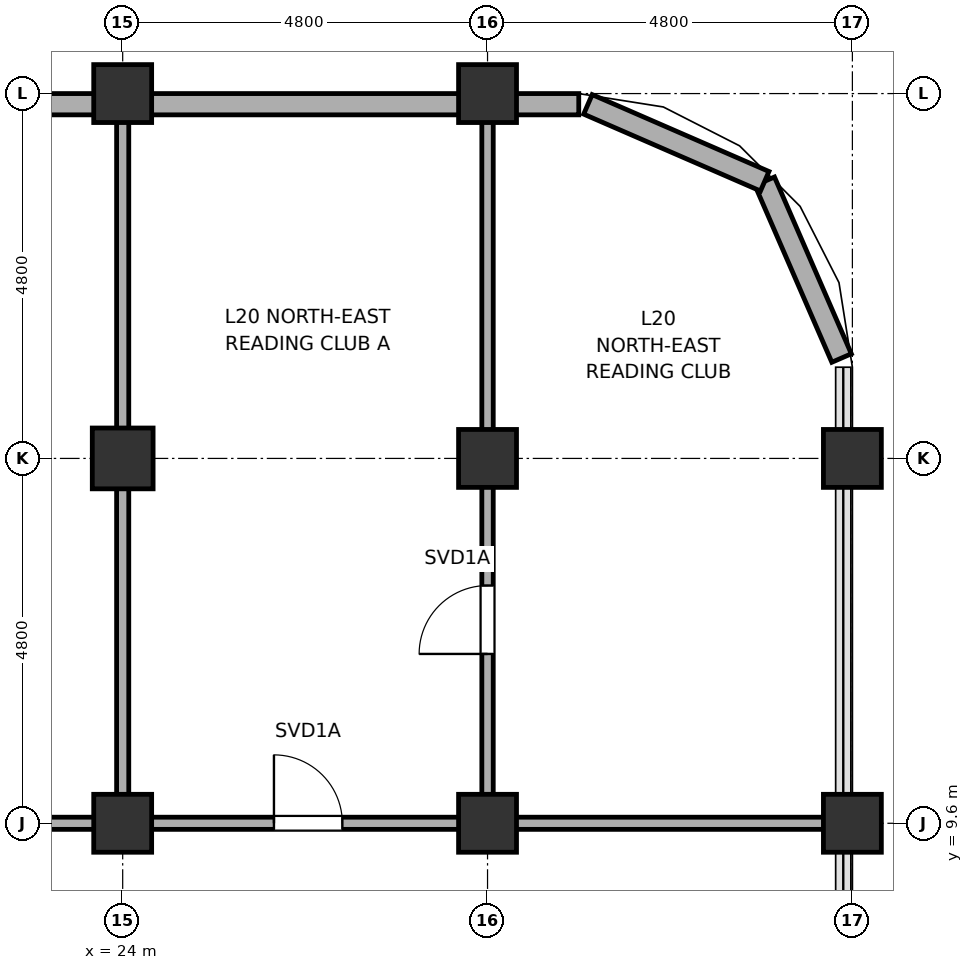
"""IFC4 building model, lengths in metres.
Left out: names, types, materials, properties, quantities, classifications, styles, units other than length and angle.
Written with IfcOpenShell. Run it as: python <this file> out.ifc"""

import sys

from ifc_helpers import new_model, si_unit, direction, frame, frame_2d, origin, origin_2d, place, context, subcontext, project, spatial, rectangle, hollow_rectangle, hollow_circle, extrude, element, fill, save


model = new_model("IFC4")
c1 = context("Model", 3, precision=1e-05, world=origin(), true_north=direction((0.0, 1.0)))
c2 = subcontext(c1, "Body", "Model", "MODEL_VIEW")
j1 = project(units=[si_unit("LENGTHUNIT", "METRE"), si_unit("PLANEANGLEUNIT", "RADIAN")], contexts=[c1])
p1 = place(None, origin())
s1 = spatial("IfcSite", under=j1, at=p1, CompositionType="ELEMENT")
p2 = place(p1, origin())
s2 = spatial("IfcBuilding", under=s1, at=p2, CompositionType="ELEMENT")
p3 = place(p2, frame((0.0, 0.0, 85.5)))
s3 = spatial("IfcBuildingStorey", under=s2, at=p3, CompositionType="ELEMENT", Elevation=85.5)
p4 = place(p3, frame((24.0, 9.6, 0.0), z_axis=(0.0, 0.0, 1.0), x_axis=(1.0, 0.0, 0.0)))
e1 = element("IfcColumn", 1, at=p4, inside=s3, PredefinedType="COLUMN", context=c2, shape_type="SweptSolid", body=[
    extrude(hollow_circle(Radius=0.381, WallThickness=0.032, at=origin_2d()), origin(), (0.0, 0.0, 1.0), 3.7),
])
p5 = place(p3, frame((24.0, 14.4, 0.0), z_axis=(0.0, 0.0, 1.0), x_axis=(1.0, 0.0, 0.0)))
e2 = element("IfcColumn", 2, at=p5, inside=s3, PredefinedType="COLUMN", context=c2, shape_type="SweptSolid", body=[
    extrude(hollow_rectangle(XDim=0.8, YDim=0.8, WallThickness=0.036, at=origin_2d()), origin(), (0.0, 0.0, 1.0), 3.7),
])
for number, where, z_axis, x_axis in (
    (3, (24.0, 19.2, 0.0), (0.0, 0.0, 1.0), (1.0, 0.0, 0.0)),
    (4, (28.8, 9.6, 0.0), (0.0, 0.0, 1.0), (1.0, 0.0, 0.0)),
    (5, (28.8, 14.4, 0.0), (0.0, 0.0, 1.0), (1.0, 0.0, 0.0)),
    (6, (28.8, 19.2, 0.0), (0.0, 0.0, 1.0), (1.0, 0.0, 0.0)),
    (7, (33.6, 9.6, 0.0), (0.0, 0.0, 1.0), (1.0, 0.0, 0.0)),
    (8, (33.6, 14.4, 0.0), (0.0, 0.0, 1.0), (1.0, 0.0, 0.0)),
):
    element("IfcColumn", number, at=place(p3, frame(where, z_axis=z_axis, x_axis=x_axis)), inside=s3, PredefinedType="COLUMN", context=c2, shape_type="SweptSolid", body=[
        extrude(hollow_circle(Radius=0.381, WallThickness=0.032, at=origin_2d()), origin(), (0.0, 0.0, 1.0), 3.7),
    ])
p6 = place(p3, frame((33.458, 15.721, 0.0), z_axis=(0.0, 0.0, 1.0), x_axis=(-0.398792985289, 0.917040977756, 0.0)))
e9 = element("IfcWall", 9, at=p6, inside=s3, PredefinedType="SOLIDWALL", context=c2, shape_type="SweptSolid", body=[
    extrude(rectangle(XDim=2.536, YDim=0.28, at=frame_2d((1.268, 0.0))), origin(), (0.0, 0.0, 1.0), 2.05),
])
p7 = place(p3, frame((32.447, 18.047, 0.0), z_axis=(0.0, 0.0, 1.0), x_axis=(-0.917060872934, 0.398747232384, 0.0)))
e10 = element("IfcWall", 10, at=p7, inside=s3, PredefinedType="SOLIDWALL", context=c2, shape_type="SweptSolid", body=[
    extrude(rectangle(XDim=2.536, YDim=0.28, at=frame_2d((1.268, 0.0))), origin(), (0.0, 0.0, 1.0), 2.05),
])
p8 = place(p3, frame((4.75, 19.06, 0.0), z_axis=(0.0, 0.0, 1.0), x_axis=(1.0, 0.0, 0.0)))
e11 = element("IfcWall", 11, at=p8, inside=s3, PredefinedType="SOLIDWALL", context=c2, shape_type="SweptSolid", body=[
    extrude(rectangle(XDim=25.25, YDim=0.28, at=frame_2d((12.625, 0.0))), origin(), (0.0, 0.0, 1.0), 2.05),
])
p9 = place(p8, frame((1.55, 0.0, 0.75)))
e12 = element("IfcOpeningElement", 12, at=p9, cuts=e11, PredefinedType="OPENING", context=c2, shape_type="SweptSolid", body=[
    extrude(rectangle(XDim=1.8, YDim=1.15, at=frame_2d((0.9, 0.575))), frame((0.0, 0.155, 0.0), z_axis=(0.0, -1.0, 0.0), x_axis=(1.0, 0.0, 0.0)), (0.0, 0.0, 1.0), 0.31),
])
p10 = place(p8, frame((6.35, 0.0, 0.75)))
e13 = element("IfcOpeningElement", 13, at=p10, cuts=e11, PredefinedType="OPENING", context=c2, shape_type="SweptSolid", body=[
    extrude(rectangle(XDim=1.8, YDim=1.15, at=frame_2d((0.9, 0.575))), frame((0.0, 0.155, 0.0), z_axis=(0.0, -1.0, 0.0), x_axis=(1.0, 0.0, 0.0)), (0.0, 0.0, 1.0), 0.31),
])
p11 = place(p8, frame((11.15, 0.0, 0.75)))
e14 = element("IfcOpeningElement", 14, at=p11, cuts=e11, PredefinedType="OPENING", context=c2, shape_type="SweptSolid", body=[
    extrude(rectangle(XDim=1.8, YDim=1.15, at=frame_2d((0.9, 0.575))), frame((0.0, 0.155, 0.0), z_axis=(0.0, -1.0, 0.0), x_axis=(1.0, 0.0, 0.0)), (0.0, 0.0, 1.0), 0.31),
])
p12 = place(p8, frame((15.95, 0.0, 0.75)))
e15 = element("IfcOpeningElement", 15, at=p12, cuts=e11, PredefinedType="OPENING", context=c2, shape_type="SweptSolid", body=[
    extrude(rectangle(XDim=1.8, YDim=1.15, at=frame_2d((0.9, 0.575))), frame((0.0, 0.155, 0.0), z_axis=(0.0, -1.0, 0.0), x_axis=(1.0, 0.0, 0.0)), (0.0, 0.0, 1.0), 0.31),
])
p13 = place(p3, frame((-28.63, 9.6, 0.0), z_axis=(0.0, 0.0, 1.0), x_axis=(1.0, 0.0, 0.0)))
e16 = element("IfcWall", 16, at=p13, inside=s3, PredefinedType="PARTITIONING", context=c2, shape_type="SweptSolid", body=[
    extrude(rectangle(XDim=62.06, YDim=0.16, at=frame_2d((31.03, 0.0))), origin(), (0.0, 0.0, 1.0), 2.05),
])
p14 = place(p13, frame((6.54, 0.0, 0.0)))
e17 = element("IfcOpeningElement", 17, at=p14, cuts=e16, PredefinedType="OPENING", context=c2, shape_type="SweptSolid", body=[
    extrude(rectangle(XDim=0.9, YDim=2.02, at=frame_2d((0.45, 1.01))), frame((0.0, 0.095, 0.0), z_axis=(0.0, -1.0, 0.0), x_axis=(1.0, 0.0, 0.0)), (0.0, 0.0, 1.0), 0.19),
])
p15 = place(p13, frame((54.62, 0.0, 0.0)))
e18 = element("IfcOpeningElement", 18, at=p15, cuts=e16, PredefinedType="OPENING", context=c2, shape_type="SweptSolid", body=[
    extrude(rectangle(XDim=0.9, YDim=2.02, at=frame_2d((0.45, 1.01))), frame((0.0, 0.095, 0.0), z_axis=(0.0, -1.0, 0.0), x_axis=(1.0, 0.0, 0.0)), (0.0, 0.0, 1.0), 0.19),
])
p16 = place(p13, frame((10.69, 0.0, 0.0)))
e19 = element("IfcOpeningElement", 19, at=p16, cuts=e16, PredefinedType="OPENING", context=c2, shape_type="SweptSolid", body=[
    extrude(rectangle(XDim=0.9, YDim=2.02, at=frame_2d((0.45, 1.01))), frame((0.0, 0.095, 0.0), z_axis=(0.0, -1.0, 0.0), x_axis=(1.0, 0.0, 0.0)), (0.0, 0.0, 1.0), 0.19),
])
p17 = place(p13, frame((12.58, 0.0, 0.0)))
e20 = element("IfcOpeningElement", 20, at=p17, cuts=e16, PredefinedType="OPENING", context=c2, shape_type="SweptSolid", body=[
    extrude(rectangle(XDim=0.9, YDim=2.02, at=frame_2d((0.45, 1.01))), frame((0.0, 0.095, 0.0), z_axis=(0.0, -1.0, 0.0), x_axis=(1.0, 0.0, 0.0)), (0.0, 0.0, 1.0), 0.19),
])
p18 = place(p13, frame((16.74, 0.0, 0.0)))
e21 = element("IfcOpeningElement", 21, at=p18, cuts=e16, PredefinedType="OPENING", context=c2, shape_type="SweptSolid", body=[
    extrude(rectangle(XDim=0.92, YDim=2.02, at=frame_2d((0.46, 1.01))), frame((0.0, 0.095, 0.0), z_axis=(0.0, -1.0, 0.0), x_axis=(1.0, 0.0, 0.0)), (0.0, 0.0, 1.0), 0.19),
])
p19 = place(p13, frame((20.4, 0.0, 0.0)))
e22 = element("IfcOpeningElement", 22, at=p19, cuts=e16, PredefinedType="OPENING", context=c2, shape_type="SweptSolid", body=[
    extrude(rectangle(XDim=0.92, YDim=2.02, at=frame_2d((0.46, 1.01))), frame((0.0, 0.095, 0.0), z_axis=(0.0, -1.0, 0.0), x_axis=(1.0, 0.0, 0.0)), (0.0, 0.0, 1.0), 0.19),
])
p20 = place(p13, frame((26.34, 0.0, 0.0)))
e23 = element("IfcOpeningElement", 23, at=p20, cuts=e16, PredefinedType="OPENING", context=c2, shape_type="SweptSolid", body=[
    extrude(rectangle(XDim=0.92, YDim=2.02, at=frame_2d((0.46, 1.01))), frame((0.0, 0.095, 0.0), z_axis=(0.0, -1.0, 0.0), x_axis=(1.0, 0.0, 0.0)), (0.0, 0.0, 1.0), 0.19),
])
p21 = place(p13, frame((30.0, 0.0, 0.0)))
e24 = element("IfcOpeningElement", 24, at=p21, cuts=e16, PredefinedType="OPENING", context=c2, shape_type="SweptSolid", body=[
    extrude(rectangle(XDim=0.92, YDim=2.02, at=frame_2d((0.46, 1.01))), frame((0.0, 0.095, 0.0), z_axis=(0.0, -1.0, 0.0), x_axis=(1.0, 0.0, 0.0)), (0.0, 0.0, 1.0), 0.19),
])
p22 = place(p13, frame((35.38, 0.0, 0.0)))
e25 = element("IfcOpeningElement", 25, at=p22, cuts=e16, PredefinedType="OPENING", context=c2, shape_type="SweptSolid", body=[
    extrude(rectangle(XDim=0.9, YDim=2.02, at=frame_2d((0.45, 1.01))), frame((0.0, 0.095, 0.0), z_axis=(0.0, -1.0, 0.0), x_axis=(1.0, 0.0, 0.0)), (0.0, 0.0, 1.0), 0.19),
])
p23 = place(p13, frame((40.18, 0.0, 0.0)))
e26 = element("IfcOpeningElement", 26, at=p23, cuts=e16, PredefinedType="OPENING", context=c2, shape_type="SweptSolid", body=[
    extrude(rectangle(XDim=0.9, YDim=2.02, at=frame_2d((0.45, 1.01))), frame((0.0, 0.095, 0.0), z_axis=(0.0, -1.0, 0.0), x_axis=(1.0, 0.0, 0.0)), (0.0, 0.0, 1.0), 0.19),
])
p24 = place(p13, frame((44.98, 0.0, 0.0)))
e27 = element("IfcOpeningElement", 27, at=p24, cuts=e16, PredefinedType="OPENING", context=c2, shape_type="SweptSolid", body=[
    extrude(rectangle(XDim=0.9, YDim=2.02, at=frame_2d((0.45, 1.01))), frame((0.0, 0.095, 0.0), z_axis=(0.0, -1.0, 0.0), x_axis=(1.0, 0.0, 0.0)), (0.0, 0.0, 1.0), 0.19),
])
p25 = place(p13, frame((50.34, 0.0, 0.0)))
e28 = element("IfcOpeningElement", 28, at=p25, cuts=e16, PredefinedType="OPENING", context=c2, shape_type="SweptSolid", body=[
    extrude(rectangle(XDim=0.92, YDim=2.02, at=frame_2d((0.46, 1.01))), frame((0.0, 0.095, 0.0), z_axis=(0.0, -1.0, 0.0), x_axis=(1.0, 0.0, 0.0)), (0.0, 0.0, 1.0), 0.19),
])
p26 = place(p3, frame((24.0, 9.72, 0.0), z_axis=(0.0, 0.0, 1.0), x_axis=(0.0, 1.0, 0.0)))
e29 = element("IfcWall", 29, at=p26, inside=s3, PredefinedType="PARTITIONING", context=c2, shape_type="SweptSolid", body=[
    extrude(rectangle(XDim=9.19, YDim=0.16, at=frame_2d((4.595, 0.0))), origin(), (0.0, 0.0, 1.0), 2.05),
])
p27 = place(p3, frame((28.8, 9.72, 0.0), z_axis=(0.0, 0.0, 1.0), x_axis=(0.0, 1.0, 0.0)))
e30 = element("IfcWall", 30, at=p27, inside=s3, PredefinedType="PARTITIONING", context=c2, shape_type="SweptSolid", body=[
    extrude(rectangle(XDim=9.19, YDim=0.15, at=frame_2d((4.595, 0.0))), origin(), (0.0, 0.0, 1.0), 2.05),
])
p28 = place(p27, frame((2.108, 0.0, 0.0)))
e31 = element("IfcOpeningElement", 31, at=p28, cuts=e30, PredefinedType="OPENING", context=c2, shape_type="SweptSolid", body=[
    extrude(rectangle(XDim=0.9, YDim=2.02, at=frame_2d((0.45, 1.01))), frame((0.0, 0.09, 0.0), z_axis=(0.0, -1.0, 0.0), x_axis=(1.0, 0.0, 0.0)), (0.0, 0.0, 1.0), 0.18),
])
p29 = place(p15, origin())
e32 = element("IfcDoor", 32, at=p29, inside=s3, OperationType="SINGLE_SWING_LEFT", PredefinedType="DOOR", context=c2, shape_type="SweptSolid", body=[
    extrude(rectangle(XDim=0.9, YDim=2.02, at=frame_2d((0.45, 1.01))), frame((0.0, 0.025, 0.0), z_axis=(0.0, -1.0, 0.0), x_axis=(1.0, 0.0, 0.0)), (0.0, 0.0, 1.0), 0.05),
])
fill(e18, e32)
p30 = place(p28, origin())
e33 = element("IfcDoor", 33, at=p30, inside=s3, OperationType="SINGLE_SWING_RIGHT", PredefinedType="DOOR", context=c2, shape_type="SweptSolid", body=[
    extrude(rectangle(XDim=0.9, YDim=2.02, at=frame_2d((0.45, 1.01))), frame((0.0, 0.025, 0.0), z_axis=(0.0, -1.0, 0.0), x_axis=(1.0, 0.0, 0.0)), (0.0, 0.0, 1.0), 0.05),
])
fill(e31, e33)
save(model, sys.argv[1])
